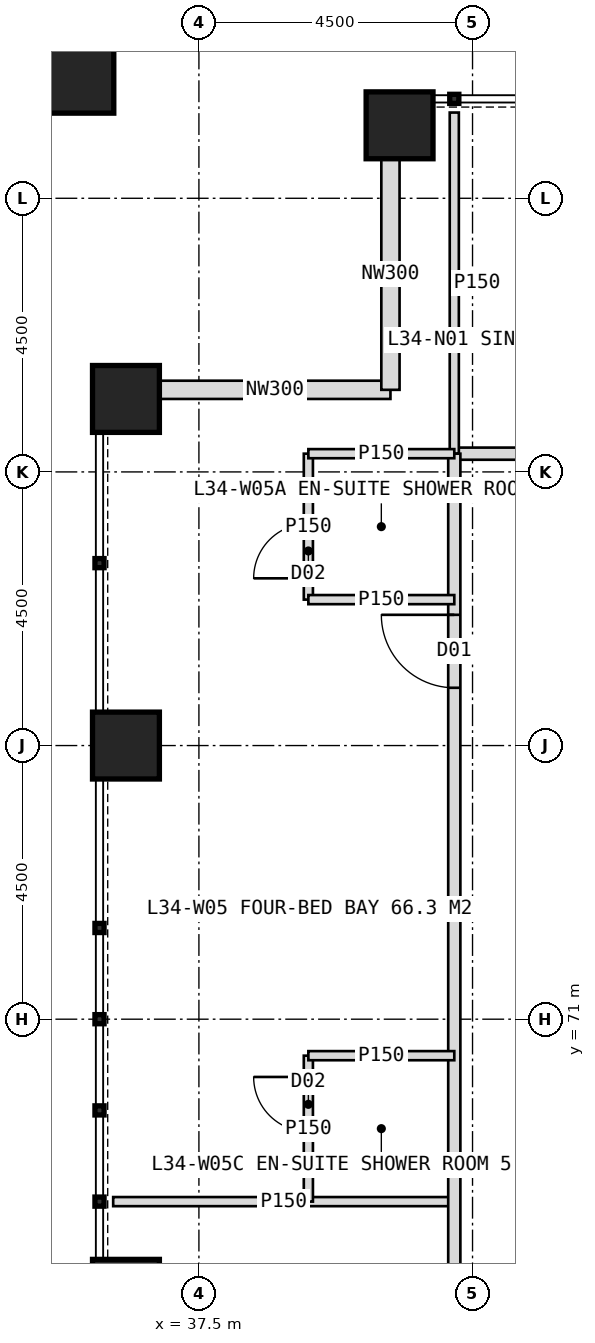
"""IFC4 building model, lengths in metres.
Left out: names, types, materials, properties, quantities, classifications, styles, units other than length and angle.
Written with IfcOpenShell. Run it as: python <this file> out.ifc"""

import sys

from ifc_helpers import new_model, si_unit, direction, frame, frame_2d, origin, origin_2d, place, context, subcontext, project, spatial, rectangle, hollow_rectangle, extrude, element, fill, save


model = new_model("IFC4")
c1 = context("Model", 3, precision=1e-05, world=origin(), true_north=direction((0.0, 1.0)))
c2 = subcontext(c1, "Body", "Model", "MODEL_VIEW")
j1 = project(units=[si_unit("LENGTHUNIT", "METRE"), si_unit("PLANEANGLEUNIT", "RADIAN")], contexts=[c1])
p1 = place(None, origin())
s1 = spatial("IfcSite", under=j1, at=p1, CompositionType="ELEMENT")
p2 = place(p1, origin())
s2 = spatial("IfcBuilding", under=s1, at=p2, CompositionType="ELEMENT")
p3 = place(p2, frame((0.0, 0.0, 144.0)))
s3 = spatial("IfcBuildingStorey", under=s2, at=p3, CompositionType="ELEMENT", Elevation=144.0)
for number, where, z_axis, x_axis in (
    (1, (40.8, 85.7, 0.0), (0.0, 0.0, 1.0), (1.0, 0.0, 0.0)),
    (2, (36.3, 66.5, 0.0), (0.0, 0.0, 1.0), (1.0, 0.0, 0.0)),
    (3, (36.3, 75.5, 0.0), (0.0, 0.0, 1.0), (1.0, 0.0, 0.0)),
    (4, (36.3, 81.2, 0.0), (0.0, 0.0, 1.0), (1.0, 0.0, 0.0)),
):
    element("IfcColumn", number, at=place(p3, frame(where, z_axis=z_axis, x_axis=x_axis)), inside=s3, PredefinedType="COLUMN", context=c2, shape_type="SweptSolid", body=[
        extrude(hollow_rectangle(XDim=1.1, YDim=1.1, WallThickness=0.1, at=origin_2d()), origin(), (0.0, 0.0, 1.0), 4.0),
    ])
p4 = place(p3, frame((35.4, 86.6, 0.0), z_axis=(0.0, 0.0, 1.0), x_axis=(1.0, 0.0, 0.0)))
e5 = element("IfcColumn", 5, at=p4, inside=s3, PredefinedType="COLUMN", context=c2, shape_type="SweptSolid", body=[
    extrude(hollow_rectangle(XDim=1.4, YDim=1.4, WallThickness=0.08, at=origin_2d()), origin(), (0.0, 0.0, 1.0), 4.0),
])
for number, where, z_axis, x_axis in (
    (6, (36.85, 81.35, 0.0), (0.0, 0.0, 1.0), (1.0, 0.0, 0.0)),
    (7, (40.65, 81.35, 0.0), (0.0, 0.0, 1.0), (0.0, 1.0, 0.0)),
):
    element("IfcWall", number, at=place(p3, frame(where, z_axis=z_axis, x_axis=x_axis)), inside=s3, PredefinedType="ELEMENTEDWALL", context=c2, shape_type="SweptSolid", body=[
        extrude(rectangle(XDim=3.8, YDim=0.3, at=frame_2d((1.9, 0.0))), origin(), (0.0, 0.0, 1.0), 4.0),
    ])
p5 = place(p3, frame((41.7, 80.3, 0.0), z_axis=(0.0, 0.0, 1.0), x_axis=(1.0, 0.0, 0.0)))
e8 = element("IfcWall", 8, at=p5, inside=s3, PredefinedType="PARTITIONING", context=c2, shape_type="SweptSolid", body=[
    extrude(rectangle(XDim=36.6, YDim=0.2, at=frame_2d((18.3, 0.0))), origin(), (0.0, 0.0, 1.0), 3.75),
])
p6 = place(p5, frame((3.35, 0.0, 0.0)))
e9 = element("IfcOpeningElement", 9, at=p6, cuts=e8, PredefinedType="OPENING", context=c2, shape_type="SweptSolid", body=[
    extrude(rectangle(XDim=1.2, YDim=2.2, at=frame_2d((0.6, 1.1))), frame((0.0, 0.11, 0.0), z_axis=(0.0, -1.0, 0.0), x_axis=(1.0, 0.0, 0.0)), (0.0, 0.0, 1.0), 0.22),
])
p7 = place(p5, frame((8.8, 0.0, 0.0)))
e10 = element("IfcOpeningElement", 10, at=p7, cuts=e8, PredefinedType="OPENING", context=c2, shape_type="SweptSolid", body=[
    extrude(rectangle(XDim=1.0, YDim=2.1, at=frame_2d((0.5, 1.05))), frame((0.0, 0.11, 0.0), z_axis=(0.0, -1.0, 0.0), x_axis=(1.0, 0.0, 0.0)), (0.0, 0.0, 1.0), 0.22),
])
p8 = place(p5, frame((15.35, 0.0, 0.0)))
e11 = element("IfcOpeningElement", 11, at=p8, cuts=e8, PredefinedType="OPENING", context=c2, shape_type="SweptSolid", body=[
    extrude(rectangle(XDim=1.2, YDim=2.2, at=frame_2d((0.6, 1.1))), frame((0.0, 0.11, 0.0), z_axis=(0.0, -1.0, 0.0), x_axis=(1.0, 0.0, 0.0)), (0.0, 0.0, 1.0), 0.22),
])
p9 = place(p5, frame((22.45, 0.0, 0.0)))
e12 = element("IfcOpeningElement", 12, at=p9, cuts=e8, PredefinedType="OPENING", context=c2, shape_type="SweptSolid", body=[
    extrude(rectangle(XDim=1.2, YDim=2.2, at=frame_2d((0.6, 1.1))), frame((0.0, 0.11, 0.0), z_axis=(0.0, -1.0, 0.0), x_axis=(1.0, 0.0, 0.0)), (0.0, 0.0, 1.0), 0.22),
])
for number, where, z_axis, x_axis in (
    (13, (41.7, 80.3, 0.0), (0.0, 0.0, 1.0), (0.0, 1.0, 0.0)),
    (14, (41.7, 68.0, 0.0), (0.0, 0.0, 1.0), (-1.0, 0.0, 0.0)),
):
    element("IfcWall", number, at=place(p3, frame(where, z_axis=z_axis, x_axis=x_axis)), inside=s3, PredefinedType="PARTITIONING", context=c2, shape_type="SweptSolid", body=[
        extrude(rectangle(XDim=5.61, YDim=0.15, at=frame_2d((2.805, 0.0))), origin(), (0.0, 0.0, 1.0), 3.75),
    ])
p10 = place(p3, frame((41.7, 43.7, 0.0), z_axis=(0.0, 0.0, 1.0), x_axis=(0.0, 1.0, 0.0)))
e15 = element("IfcWall", 15, at=p10, inside=s3, PredefinedType="PARTITIONING", context=c2, shape_type="SweptSolid", body=[
    extrude(rectangle(XDim=36.6, YDim=0.2, at=frame_2d((18.3, 0.0))), origin(), (0.0, 0.0, 1.0), 3.75),
])
p11 = place(p10, frame((3.35, 0.0, 0.0)))
e16 = element("IfcOpeningElement", 16, at=p11, cuts=e15, PredefinedType="OPENING", context=c2, shape_type="SweptSolid", body=[
    extrude(rectangle(XDim=1.2, YDim=2.2, at=frame_2d((0.6, 1.1))), frame((0.0, 0.11, 0.0), z_axis=(0.0, -1.0, 0.0), x_axis=(1.0, 0.0, 0.0)), (0.0, 0.0, 1.0), 0.22),
])
p12 = place(p10, frame((11.05, 0.0, 0.0)))
e17 = element("IfcOpeningElement", 17, at=p12, cuts=e15, PredefinedType="OPENING", context=c2, shape_type="SweptSolid", body=[
    extrude(rectangle(XDim=1.2, YDim=2.2, at=frame_2d((0.6, 1.1))), frame((0.0, 0.11, 0.0), z_axis=(0.0, -1.0, 0.0), x_axis=(1.0, 0.0, 0.0)), (0.0, 0.0, 1.0), 0.22),
])
p13 = place(p10, frame((16.3, 0.0, 0.0)))
e18 = element("IfcOpeningElement", 18, at=p13, cuts=e15, PredefinedType="OPENING", context=c2, shape_type="SweptSolid", body=[
    extrude(rectangle(XDim=1.0, YDim=2.1, at=frame_2d((0.5, 1.05))), frame((0.0, 0.11, 0.0), z_axis=(0.0, -1.0, 0.0), x_axis=(1.0, 0.0, 0.0)), (0.0, 0.0, 1.0), 0.22),
])
p14 = place(p10, frame((20.95, 0.0, 0.0)))
e19 = element("IfcOpeningElement", 19, at=p14, cuts=e15, PredefinedType="OPENING", context=c2, shape_type="SweptSolid", body=[
    extrude(rectangle(XDim=1.2, YDim=2.2, at=frame_2d((0.6, 1.1))), frame((0.0, 0.11, 0.0), z_axis=(0.0, -1.0, 0.0), x_axis=(1.0, 0.0, 0.0)), (0.0, 0.0, 1.0), 0.22),
])
p15 = place(p10, frame((32.75, 0.0, 0.0)))
e20 = element("IfcOpeningElement", 20, at=p15, cuts=e15, PredefinedType="OPENING", context=c2, shape_type="SweptSolid", body=[
    extrude(rectangle(XDim=1.2, YDim=2.2, at=frame_2d((0.6, 1.1))), frame((0.0, 0.11, 0.0), z_axis=(0.0, -1.0, 0.0), x_axis=(1.0, 0.0, 0.0)), (0.0, 0.0, 1.0), 0.22),
])
p16 = place(p3, frame((39.3, 77.9, 0.0), z_axis=(0.0, 0.0, 1.0), x_axis=(0.0, 1.0, 0.0)))
e21 = element("IfcWall", 21, at=p16, inside=s3, PredefinedType="PARTITIONING", context=c2, shape_type="SweptSolid", body=[
    extrude(rectangle(XDim=2.4, YDim=0.15, at=frame_2d((1.2, 0.0))), origin(), (0.0, 0.0, 1.0), 3.75),
])
p17 = place(p16, frame((0.35, 0.0, 0.0)))
e22 = element("IfcOpeningElement", 22, at=p17, cuts=e21, PredefinedType="OPENING", context=c2, shape_type="SweptSolid", body=[
    extrude(rectangle(XDim=0.9, YDim=2.1, at=frame_2d((0.45, 1.05))), frame((0.0, 0.085, 0.0), z_axis=(0.0, -1.0, 0.0), x_axis=(1.0, 0.0, 0.0)), (0.0, 0.0, 1.0), 0.17),
])
p18 = place(p3, frame((41.7, 77.9, 0.0), z_axis=(0.0, 0.0, 1.0), x_axis=(-1.0, 0.0, 0.0)))
e23 = element("IfcWall", 23, at=p18, inside=s3, PredefinedType="PARTITIONING", context=c2, shape_type="SweptSolid", body=[
    extrude(rectangle(XDim=2.4, YDim=0.15, at=frame_2d((1.2, 0.0))), origin(), (0.0, 0.0, 1.0), 3.75),
])
p19 = place(p3, frame((39.3, 68.0, 0.0), z_axis=(0.0, 0.0, 1.0), x_axis=(0.0, 1.0, 0.0)))
e24 = element("IfcWall", 24, at=p19, inside=s3, PredefinedType="PARTITIONING", context=c2, shape_type="SweptSolid", body=[
    extrude(rectangle(XDim=2.4, YDim=0.15, at=frame_2d((1.2, 0.0))), origin(), (0.0, 0.0, 1.0), 3.75),
])
p20 = place(p19, frame((1.15, 0.0, 0.0)))
e25 = element("IfcOpeningElement", 25, at=p20, cuts=e24, PredefinedType="OPENING", context=c2, shape_type="SweptSolid", body=[
    extrude(rectangle(XDim=0.9, YDim=2.1, at=frame_2d((0.45, 1.05))), frame((0.0, 0.085, 0.0), z_axis=(0.0, -1.0, 0.0), x_axis=(1.0, 0.0, 0.0)), (0.0, 0.0, 1.0), 0.17),
])
for number, where, z_axis, x_axis in (
    (26, (41.7, 70.4, 0.0), (0.0, 0.0, 1.0), (-1.0, 0.0, 0.0)),
    (27, (41.7, 80.3, 0.0), (0.0, 0.0, 1.0), (-1.0, 0.0, 0.0)),
):
    element("IfcWall", number, at=place(p3, frame(where, z_axis=z_axis, x_axis=x_axis)), inside=s3, PredefinedType="PARTITIONING", context=c2, shape_type="SweptSolid", body=[
        extrude(rectangle(XDim=2.4, YDim=0.15, at=frame_2d((1.2, 0.0))), origin(), (0.0, 0.0, 1.0), 3.75),
    ])
p21 = place(p15, origin())
e28 = element("IfcDoor", 28, at=p21, inside=s3, OperationType="SINGLE_SWING_RIGHT", PredefinedType="DOOR", context=c2, shape_type="SweptSolid", body=[
    extrude(rectangle(XDim=1.2, YDim=2.2, at=frame_2d((0.6, 1.1))), frame((0.0, 0.025, 0.0), z_axis=(0.0, -1.0, 0.0), x_axis=(1.0, 0.0, 0.0)), (0.0, 0.0, 1.0), 0.05),
])
fill(e20, e28)
p22 = place(p17, origin())
e29 = element("IfcDoor", 29, at=p22, inside=s3, OperationType="SINGLE_SWING_LEFT", PredefinedType="DOOR", context=c2, shape_type="SweptSolid", body=[
    extrude(rectangle(XDim=0.9, YDim=2.1, at=frame_2d((0.45, 1.05))), frame((0.0, 0.025, 0.0), z_axis=(0.0, -1.0, 0.0), x_axis=(1.0, 0.0, 0.0)), (0.0, 0.0, 1.0), 0.05),
])
fill(e22, e29)
p23 = place(p20, origin())
e30 = element("IfcDoor", 30, at=p23, inside=s3, OperationType="SINGLE_SWING_RIGHT", PredefinedType="DOOR", context=c2, shape_type="SweptSolid", body=[
    extrude(rectangle(XDim=0.9, YDim=2.1, at=frame_2d((0.45, 1.05))), frame((0.0, 0.025, 0.0), z_axis=(0.0, -1.0, 0.0), x_axis=(1.0, 0.0, 0.0)), (0.0, 0.0, 1.0), 0.05),
])
fill(e25, e30)
save(model, sys.argv[1])
